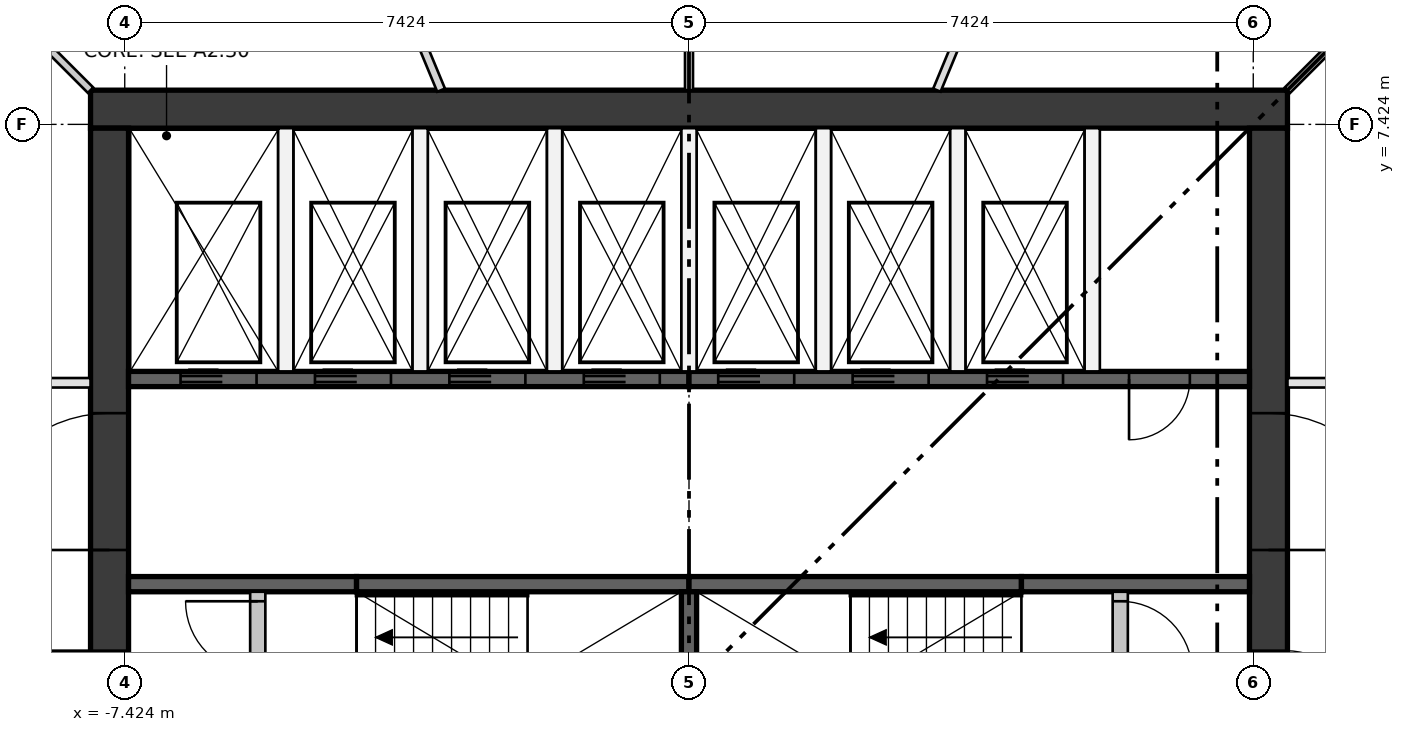
"""IFC4 building model, lengths in metres.
Left out: names, types, materials, properties, quantities, classifications, styles, units other than length and angle.
Written with IfcOpenShell. Run it as: python <this file> out.ifc"""

import sys

from ifc_helpers import new_model, si_unit, direction, frame, frame_2d, origin, place, context, subcontext, project, spatial, rectangle, extrude, element, fill, save


model = new_model("IFC4")
c1 = context("Model", 3, precision=1e-05, world=origin(), true_north=direction((0.0, 1.0)))
c2 = subcontext(c1, "Body", "Model", "MODEL_VIEW")
j1 = project(units=[si_unit("LENGTHUNIT", "METRE"), si_unit("PLANEANGLEUNIT", "RADIAN")], contexts=[c1])
p1 = place(None, origin())
s1 = spatial("IfcSite", under=j1, at=p1, CompositionType="ELEMENT")
p2 = place(p1, origin())
s2 = spatial("IfcBuilding", under=s1, at=p2, CompositionType="ELEMENT")
p3 = place(p2, frame((0.0, 0.0, 187.65)))
s3 = spatial("IfcBuildingStorey", under=s2, at=p3, CompositionType="ELEMENT", Elevation=187.65)
p4 = place(p3, frame((-7.874, 7.624, 0.0), z_axis=(0.0, 0.0, 1.0), x_axis=(1.0, 0.0, 0.0)))
e1 = element("IfcWall", 1, at=p4, inside=s3, PredefinedType="SHEAR", context=c2, shape_type="SweptSolid", body=[
    extrude(rectangle(XDim=15.748, YDim=0.5, at=frame_2d((7.874, 0.0))), origin(), (0.0, 0.0, 1.0), 3.35),
])
p5 = place(p3, frame((-7.624, -7.374, 0.0), z_axis=(0.0, 0.0, 1.0), x_axis=(0.0, 1.0, 0.0)))
e2 = element("IfcWall", 2, at=p5, inside=s3, PredefinedType="SHEAR", context=c2, shape_type="SweptSolid", body=[
    extrude(rectangle(XDim=14.748, YDim=0.5, at=frame_2d((7.374, 0.0))), origin(), (0.0, 0.0, 1.0), 3.35),
])
p6 = place(p5, frame((6.874, 0.0, 0.0)))
e3 = element("IfcOpeningElement", 3, at=p6, cuts=e2, PredefinedType="OPENING", context=c2, shape_type="SweptSolid", body=[
    extrude(rectangle(XDim=1.0, YDim=2.1, at=frame_2d((0.5, 1.05))), frame((0.0, 0.26, 0.0), z_axis=(0.0, -1.0, 0.0), x_axis=(1.0, 0.0, 0.0)), (0.0, 0.0, 1.0), 0.52),
])
p7 = place(p5, frame((3.75, 0.0, 0.0)))
e4 = element("IfcOpeningElement", 4, at=p7, cuts=e2, PredefinedType="OPENING", context=c2, shape_type="SweptSolid", body=[
    extrude(rectangle(XDim=1.8, YDim=2.1, at=frame_2d((0.9, 1.05))), frame((0.0, 0.26, 0.0), z_axis=(0.0, -1.0, 0.0), x_axis=(1.0, 0.0, 0.0)), (0.0, 0.0, 1.0), 0.52),
])
p8 = place(p5, frame((9.198, 0.0, 0.0)))
e5 = element("IfcOpeningElement", 5, at=p8, cuts=e2, PredefinedType="OPENING", context=c2, shape_type="SweptSolid", body=[
    extrude(rectangle(XDim=1.8, YDim=2.1, at=frame_2d((0.9, 1.05))), frame((0.0, 0.26, 0.0), z_axis=(0.0, -1.0, 0.0), x_axis=(1.0, 0.0, 0.0)), (0.0, 0.0, 1.0), 0.52),
])
p9 = place(p3, frame((7.624, -7.374, 0.0), z_axis=(0.0, 0.0, 1.0), x_axis=(0.0, 1.0, 0.0)))
e6 = element("IfcWall", 6, at=p9, inside=s3, PredefinedType="SHEAR", context=c2, shape_type="SweptSolid", body=[
    extrude(rectangle(XDim=14.748, YDim=0.5, at=frame_2d((7.374, 0.0))), origin(), (0.0, 0.0, 1.0), 3.35),
])
p10 = place(p9, frame((6.874, 0.0, 0.0)))
e7 = element("IfcOpeningElement", 7, at=p10, cuts=e6, PredefinedType="OPENING", context=c2, shape_type="SweptSolid", body=[
    extrude(rectangle(XDim=1.0, YDim=2.1, at=frame_2d((0.5, 1.05))), frame((0.0, 0.26, 0.0), z_axis=(0.0, -1.0, 0.0), x_axis=(1.0, 0.0, 0.0)), (0.0, 0.0, 1.0), 0.52),
])
p11 = place(p9, frame((3.75, 0.0, 0.0)))
e8 = element("IfcOpeningElement", 8, at=p11, cuts=e6, PredefinedType="OPENING", context=c2, shape_type="SweptSolid", body=[
    extrude(rectangle(XDim=1.8, YDim=2.1, at=frame_2d((0.9, 1.05))), frame((0.0, 0.26, 0.0), z_axis=(0.0, -1.0, 0.0), x_axis=(1.0, 0.0, 0.0)), (0.0, 0.0, 1.0), 0.52),
])
p12 = place(p9, frame((9.198, 0.0, 0.0)))
e9 = element("IfcOpeningElement", 9, at=p12, cuts=e6, PredefinedType="OPENING", context=c2, shape_type="SweptSolid", body=[
    extrude(rectangle(XDim=1.8, YDim=2.1, at=frame_2d((0.9, 1.05))), frame((0.0, 0.26, 0.0), z_axis=(0.0, -1.0, 0.0), x_axis=(1.0, 0.0, 0.0)), (0.0, 0.0, 1.0), 0.52),
])
p13 = place(p3, frame((-7.374, 4.074, 0.0), z_axis=(0.0, 0.0, 1.0), x_axis=(1.0, 0.0, 0.0)))
e10 = element("IfcWall", 10, at=p13, inside=s3, PredefinedType="SHEAR", context=c2, shape_type="SweptSolid", body=[
    extrude(rectangle(XDim=7.374, YDim=0.2, at=frame_2d((3.687, 0.0))), origin(), (0.0, 0.0, 1.0), 3.0),
])
p14 = place(p13, frame((0.684, 0.0, 0.0)))
e11 = element("IfcOpeningElement", 11, at=p14, cuts=e10, PredefinedType="OPENING", context=c2, shape_type="SweptSolid", body=[
    extrude(rectangle(XDim=1.0, YDim=2.1, at=frame_2d((0.5, 1.05))), frame((0.0, 0.11, 0.0), z_axis=(0.0, -1.0, 0.0), x_axis=(1.0, 0.0, 0.0)), (0.0, 0.0, 1.0), 0.22),
])
p15 = place(p13, frame((2.453, 0.0, 0.0)))
e12 = element("IfcOpeningElement", 12, at=p15, cuts=e10, PredefinedType="OPENING", context=c2, shape_type="SweptSolid", body=[
    extrude(rectangle(XDim=1.0, YDim=2.1, at=frame_2d((0.5, 1.05))), frame((0.0, 0.11, 0.0), z_axis=(0.0, -1.0, 0.0), x_axis=(1.0, 0.0, 0.0)), (0.0, 0.0, 1.0), 0.22),
])
p16 = place(p13, frame((4.221, 0.0, 0.0)))
e13 = element("IfcOpeningElement", 13, at=p16, cuts=e10, PredefinedType="OPENING", context=c2, shape_type="SweptSolid", body=[
    extrude(rectangle(XDim=1.0, YDim=2.1, at=frame_2d((0.5, 1.05))), frame((0.0, 0.11, 0.0), z_axis=(0.0, -1.0, 0.0), x_axis=(1.0, 0.0, 0.0)), (0.0, 0.0, 1.0), 0.22),
])
p17 = place(p13, frame((5.99, 0.0, 0.0)))
e14 = element("IfcOpeningElement", 14, at=p17, cuts=e10, PredefinedType="OPENING", context=c2, shape_type="SweptSolid", body=[
    extrude(rectangle(XDim=1.0, YDim=2.1, at=frame_2d((0.5, 1.05))), frame((0.0, 0.11, 0.0), z_axis=(0.0, -1.0, 0.0), x_axis=(1.0, 0.0, 0.0)), (0.0, 0.0, 1.0), 0.22),
])
p18 = place(p3, frame((0.0, 4.074, 0.0), z_axis=(0.0, 0.0, 1.0), x_axis=(1.0, 0.0, 0.0)))
e15 = element("IfcWall", 15, at=p18, inside=s3, PredefinedType="SHEAR", context=c2, shape_type="SweptSolid", body=[
    extrude(rectangle(XDim=7.374, YDim=0.2, at=frame_2d((3.687, 0.0))), origin(), (0.0, 0.0, 1.0), 3.0),
])
p19 = place(p18, frame((0.384, 0.0, 0.0)))
e16 = element("IfcOpeningElement", 16, at=p19, cuts=e15, PredefinedType="OPENING", context=c2, shape_type="SweptSolid", body=[
    extrude(rectangle(XDim=1.0, YDim=2.1, at=frame_2d((0.5, 1.05))), frame((0.0, 0.11, 0.0), z_axis=(0.0, -1.0, 0.0), x_axis=(1.0, 0.0, 0.0)), (0.0, 0.0, 1.0), 0.22),
])
p20 = place(p18, frame((2.153, 0.0, 0.0)))
e17 = element("IfcOpeningElement", 17, at=p20, cuts=e15, PredefinedType="OPENING", context=c2, shape_type="SweptSolid", body=[
    extrude(rectangle(XDim=1.0, YDim=2.1, at=frame_2d((0.5, 1.05))), frame((0.0, 0.11, 0.0), z_axis=(0.0, -1.0, 0.0), x_axis=(1.0, 0.0, 0.0)), (0.0, 0.0, 1.0), 0.22),
])
p21 = place(p18, frame((3.921, 0.0, 0.0)))
e18 = element("IfcOpeningElement", 18, at=p21, cuts=e15, PredefinedType="OPENING", context=c2, shape_type="SweptSolid", body=[
    extrude(rectangle(XDim=1.0, YDim=2.1, at=frame_2d((0.5, 1.05))), frame((0.0, 0.11, 0.0), z_axis=(0.0, -1.0, 0.0), x_axis=(1.0, 0.0, 0.0)), (0.0, 0.0, 1.0), 0.22),
])
p22 = place(p18, frame((5.79, 0.0, 0.0)))
e19 = element("IfcOpeningElement", 19, at=p22, cuts=e15, PredefinedType="OPENING", context=c2, shape_type="SweptSolid", body=[
    extrude(rectangle(XDim=0.8, YDim=2.1, at=frame_2d((0.4, 1.05))), frame((0.0, 0.11, 0.0), z_axis=(0.0, -1.0, 0.0), x_axis=(1.0, 0.0, 0.0)), (0.0, 0.0, 1.0), 0.22),
])
p23 = place(p3, frame((-7.374, 1.375, 0.0), z_axis=(0.0, 0.0, 1.0), x_axis=(1.0, 0.0, 0.0)))
e20 = element("IfcWall", 20, at=p23, inside=s3, PredefinedType="SHEAR", context=c2, shape_type="SweptSolid", body=[
    extrude(rectangle(XDim=3.0, YDim=0.2, at=frame_2d((1.5, 0.0))), origin(), (0.0, 0.0, 1.0), 3.0),
])
for number, where, z_axis, x_axis in (
    (21, (-4.374, 1.375, 0.0), (0.0, 0.0, 1.0), (1.0, 0.0, 0.0)),
    (22, (0.0, 1.375, 0.0), (0.0, 0.0, 1.0), (1.0, 0.0, 0.0)),
):
    element("IfcWall", number, at=place(p3, frame(where, z_axis=z_axis, x_axis=x_axis)), inside=s3, PredefinedType="SHEAR", context=c2, shape_type="SweptSolid", body=[
        extrude(rectangle(XDim=4.374, YDim=0.2, at=frame_2d((2.187, 0.0))), origin(), (0.0, 0.0, 1.0), 3.0),
    ])
p24 = place(p3, frame((4.374, 1.375, 0.0), z_axis=(0.0, 0.0, 1.0), x_axis=(1.0, 0.0, 0.0)))
e23 = element("IfcWall", 23, at=p24, inside=s3, PredefinedType="SHEAR", context=c2, shape_type="SweptSolid", body=[
    extrude(rectangle(XDim=3.0, YDim=0.2, at=frame_2d((1.5, 0.0))), origin(), (0.0, 0.0, 1.0), 3.0),
])
p25 = place(p3, frame((0.0, -1.275, 0.0), z_axis=(0.0, 0.0, 1.0), x_axis=(0.0, 1.0, 0.0)))
e24 = element("IfcWall", 24, at=p25, inside=s3, PredefinedType="SHEAR", context=c2, shape_type="SweptSolid", body=[
    extrude(rectangle(XDim=2.55, YDim=0.2, at=frame_2d((1.275, 0.0))), origin(), (0.0, 0.0, 1.0), 3.0),
])
for number, where, z_axis, x_axis in (
    (25, (-5.305, 4.174, 0.0), (0.0, 0.0, 1.0), (0.0, 1.0, 0.0)),
    (26, (-3.537, 4.174, 0.0), (0.0, 0.0, 1.0), (0.0, 1.0, 0.0)),
    (27, (-1.769, 4.174, 0.0), (0.0, 0.0, 1.0), (0.0, 1.0, 0.0)),
    (28, (0.0, 4.174, 0.0), (0.0, 0.0, 1.0), (0.0, 1.0, 0.0)),
    (29, (1.769, 4.174, 0.0), (0.0, 0.0, 1.0), (0.0, 1.0, 0.0)),
    (30, (3.537, 4.174, 0.0), (0.0, 0.0, 1.0), (0.0, 1.0, 0.0)),
    (31, (5.305, 4.174, 0.0), (0.0, 0.0, 1.0), (0.0, 1.0, 0.0)),
):
    element("IfcWall", number, at=place(p3, frame(where, z_axis=z_axis, x_axis=x_axis)), inside=s3, PredefinedType="PARTITIONING", context=c2, shape_type="SweptSolid", body=[
        extrude(rectangle(XDim=3.2, YDim=0.2, at=frame_2d((1.6, 0.0))), origin(), (0.0, 0.0, 1.0), 3.0),
    ])
p26 = place(p3, frame((-5.674, -1.275, 0.0), z_axis=(0.0, 0.0, 1.0), x_axis=(0.0, 1.0, 0.0)))
e32 = element("IfcWall", 32, at=p26, inside=s3, PredefinedType="PARTITIONING", context=c2, shape_type="SweptSolid", body=[
    extrude(rectangle(XDim=2.55, YDim=0.2, at=frame_2d((1.275, 0.0))), origin(), (0.0, 0.0, 1.0), 3.0),
])
p27 = place(p26, frame((0.125, 0.0, 0.0)))
e33 = element("IfcOpeningElement", 33, at=p27, cuts=e32, PredefinedType="OPENING", context=c2, shape_type="SweptSolid", body=[
    extrude(rectangle(XDim=0.95, YDim=2.1, at=frame_2d((0.475, 1.05))), frame((0.0, 0.11, 0.0), z_axis=(0.0, -1.0, 0.0), x_axis=(1.0, 0.0, 0.0)), (0.0, 0.0, 1.0), 0.22),
])
p28 = place(p26, frame((1.475, 0.0, 0.0)))
e34 = element("IfcOpeningElement", 34, at=p28, cuts=e32, PredefinedType="OPENING", context=c2, shape_type="SweptSolid", body=[
    extrude(rectangle(XDim=0.95, YDim=2.1, at=frame_2d((0.475, 1.05))), frame((0.0, 0.11, 0.0), z_axis=(0.0, -1.0, 0.0), x_axis=(1.0, 0.0, 0.0)), (0.0, 0.0, 1.0), 0.22),
])
p29 = place(p3, frame((5.674, -1.275, 0.0), z_axis=(0.0, 0.0, 1.0), x_axis=(0.0, 1.0, 0.0)))
e35 = element("IfcWall", 35, at=p29, inside=s3, PredefinedType="PARTITIONING", context=c2, shape_type="SweptSolid", body=[
    extrude(rectangle(XDim=2.55, YDim=0.2, at=frame_2d((1.275, 0.0))), origin(), (0.0, 0.0, 1.0), 3.0),
])
p30 = place(p29, frame((0.125, 0.0, 0.0)))
e36 = element("IfcOpeningElement", 36, at=p30, cuts=e35, PredefinedType="OPENING", context=c2, shape_type="SweptSolid", body=[
    extrude(rectangle(XDim=0.95, YDim=2.1, at=frame_2d((0.475, 1.05))), frame((0.0, 0.11, 0.0), z_axis=(0.0, -1.0, 0.0), x_axis=(1.0, 0.0, 0.0)), (0.0, 0.0, 1.0), 0.22),
])
p31 = place(p29, frame((1.475, 0.0, 0.0)))
e37 = element("IfcOpeningElement", 37, at=p31, cuts=e35, PredefinedType="OPENING", context=c2, shape_type="SweptSolid", body=[
    extrude(rectangle(XDim=0.95, YDim=2.1, at=frame_2d((0.475, 1.05))), frame((0.0, 0.11, 0.0), z_axis=(0.0, -1.0, 0.0), x_axis=(1.0, 0.0, 0.0)), (0.0, 0.0, 1.0), 0.22),
])
p32 = place(p3, frame((7.874, 4.024, 0.0), z_axis=(0.0, 0.0, 1.0), x_axis=(1.0, 0.0, 0.0)))
e38 = element("IfcWall", 38, at=p32, inside=s3, PredefinedType="PARTITIONING", context=c2, shape_type="SweptSolid", body=[
    extrude(rectangle(XDim=3.95, YDim=0.125, at=frame_2d((1.975, 0.0))), origin(), (0.0, 0.0, 1.0), 3.0),
])
p33 = place(p32, frame((1.3, 0.0, 0.0)))
e39 = element("IfcOpeningElement", 39, at=p33, cuts=e38, PredefinedType="OPENING", context=c2, shape_type="SweptSolid", body=[
    extrude(rectangle(XDim=1.0, YDim=2.1, at=frame_2d((0.5, 1.05))), frame((0.0, 0.073, 0.0), z_axis=(0.0, -1.0, 0.0), x_axis=(1.0, 0.0, 0.0)), (0.0, 0.0, 1.0), 0.145),
])
p34 = place(p3, frame((-11.087, 4.024, 0.0), z_axis=(0.0, 0.0, 1.0), x_axis=(1.0, 0.0, 0.0)))
e40 = element("IfcWall", 40, at=p34, inside=s3, PredefinedType="PARTITIONING", context=c2, shape_type="SweptSolid", body=[
    extrude(rectangle(XDim=3.213, YDim=0.125, at=frame_2d((1.606, 0.0))), origin(), (0.0, 0.0, 1.0), 3.0),
])
p35 = place(p34, frame((1.1, 0.0, 0.0)))
e41 = element("IfcOpeningElement", 41, at=p35, cuts=e40, PredefinedType="OPENING", context=c2, shape_type="SweptSolid", body=[
    extrude(rectangle(XDim=1.0, YDim=2.1, at=frame_2d((0.5, 1.05))), frame((0.0, 0.073, 0.0), z_axis=(0.0, -1.0, 0.0), x_axis=(1.0, 0.0, 0.0)), (0.0, 0.0, 1.0), 0.145),
])
p36 = place(p3, frame((7.874, 7.874, 0.0), z_axis=(0.0, 0.0, 1.0), x_axis=(0.707106781187, 0.707106781187, 0.0)))
e42 = element("IfcWall", 42, at=p36, inside=s3, PredefinedType="PARTITIONING", context=c2, shape_type="SweptSolid", body=[
    extrude(rectangle(XDim=5.834, YDim=0.1, at=frame_2d((2.917, 0.0))), origin(), (0.0, 0.0, 1.0), 3.0),
])
p37 = place(p36, frame((1.8, 0.0, 0.0)))
e43 = element("IfcOpeningElement", 43, at=p37, cuts=e42, PredefinedType="OPENING", context=c2, shape_type="SweptSolid", body=[
    extrude(rectangle(XDim=1.0, YDim=2.1, at=frame_2d((0.5, 1.05))), frame((0.0, 0.06, 0.0), z_axis=(0.0, -1.0, 0.0), x_axis=(1.0, 0.0, 0.0)), (0.0, 0.0, 1.0), 0.12),
])
p38 = place(p3, frame((3.261, 7.874, 0.0), z_axis=(0.0, 0.0, 1.0), x_axis=(0.382701956612, 0.923871859299, 0.0)))
e44 = element("IfcWall", 44, at=p38, inside=s3, PredefinedType="PARTITIONING", context=c2, shape_type="SweptSolid", body=[
    extrude(rectangle(XDim=4.577, YDim=0.105, at=frame_2d((2.289, 0.0))), origin(), (0.0, 0.0, 1.0), 3.0),
])
p39 = place(p38, frame((1.8, 0.0, 0.0)))
e45 = element("IfcOpeningElement", 45, at=p39, cuts=e44, PredefinedType="OPENING", context=c2, shape_type="SweptSolid", body=[
    extrude(rectangle(XDim=1.0, YDim=2.1, at=frame_2d((0.5, 1.05))), frame((0.0, 0.062, 0.0), z_axis=(0.0, -1.0, 0.0), x_axis=(1.0, 0.0, 0.0)), (0.0, 0.0, 1.0), 0.125),
])
p40 = place(p3, frame((0.0, 7.874, 0.0), z_axis=(0.0, 0.0, 1.0), x_axis=(0.0, 1.0, 0.0)))
e46 = element("IfcWall", 46, at=p40, inside=s3, PredefinedType="PARTITIONING", context=c2, shape_type="SweptSolid", body=[
    extrude(rectangle(XDim=5.226, YDim=0.105, at=frame_2d((2.613, 0.0))), origin(), (0.0, 0.0, 1.0), 3.0),
])
p41 = place(p3, frame((-3.261, 7.874, 0.0), z_axis=(0.0, 0.0, 1.0), x_axis=(-0.382701956612, 0.923871859299, 0.0)))
e47 = element("IfcWall", 47, at=p41, inside=s3, PredefinedType="PARTITIONING", context=c2, shape_type="SweptSolid", body=[
    extrude(rectangle(XDim=4.577, YDim=0.11, at=frame_2d((2.289, 0.0))), origin(), (0.0, 0.0, 1.0), 3.0),
])
p42 = place(p3, frame((-12.0, 12.0, 0.0), z_axis=(0.0, 0.0, 1.0), x_axis=(0.707106781187, -0.707106781187, 0.0)))
e48 = element("IfcWall", 48, at=p42, inside=s3, PredefinedType="PARTITIONING", context=c2, shape_type="SweptSolid", body=[
    extrude(rectangle(XDim=5.834, YDim=0.1, at=frame_2d((2.917, 0.0))), origin(), (0.0, 0.0, 1.0), 3.0),
])
p43 = place(p42, frame((3.0, 0.0, 0.0)))
e49 = element("IfcOpeningElement", 49, at=p43, cuts=e48, PredefinedType="OPENING", context=c2, shape_type="SweptSolid", body=[
    extrude(rectangle(XDim=1.0, YDim=2.1, at=frame_2d((0.5, 1.05))), frame((0.0, 0.06, 0.0), z_axis=(0.0, -1.0, 0.0), x_axis=(1.0, 0.0, 0.0)), (0.0, 0.0, 1.0), 0.12),
])
p44 = place(p14, frame((1.0, 0.0, 0.0), z_axis=(0.0, 0.0, 1.0), x_axis=(-1.0, 0.0, 0.0)))
e50 = element("IfcDoor", 50, at=p44, inside=s3, OperationType="DOUBLE_DOOR_SLIDING", PredefinedType="DOOR", context=c2, shape_type="SweptSolid", body=[
    extrude(rectangle(XDim=1.0, YDim=2.1, at=frame_2d((0.5, 1.05))), frame((0.0, 0.025, 0.0), z_axis=(0.0, -1.0, 0.0), x_axis=(1.0, 0.0, 0.0)), (0.0, 0.0, 1.0), 0.05),
])
fill(e11, e50)
p45 = place(p15, frame((1.0, 0.0, 0.0), z_axis=(0.0, 0.0, 1.0), x_axis=(-1.0, 0.0, 0.0)))
e51 = element("IfcDoor", 51, at=p45, inside=s3, OperationType="DOUBLE_DOOR_SLIDING", PredefinedType="DOOR", context=c2, shape_type="SweptSolid", body=[
    extrude(rectangle(XDim=1.0, YDim=2.1, at=frame_2d((0.5, 1.05))), frame((0.0, 0.025, 0.0), z_axis=(0.0, -1.0, 0.0), x_axis=(1.0, 0.0, 0.0)), (0.0, 0.0, 1.0), 0.05),
])
fill(e12, e51)
p46 = place(p16, frame((1.0, 0.0, 0.0), z_axis=(0.0, 0.0, 1.0), x_axis=(-1.0, 0.0, 0.0)))
e52 = element("IfcDoor", 52, at=p46, inside=s3, OperationType="DOUBLE_DOOR_SLIDING", PredefinedType="DOOR", context=c2, shape_type="SweptSolid", body=[
    extrude(rectangle(XDim=1.0, YDim=2.1, at=frame_2d((0.5, 1.05))), frame((0.0, 0.025, 0.0), z_axis=(0.0, -1.0, 0.0), x_axis=(1.0, 0.0, 0.0)), (0.0, 0.0, 1.0), 0.05),
])
fill(e13, e52)
p47 = place(p17, frame((1.0, 0.0, 0.0), z_axis=(0.0, 0.0, 1.0), x_axis=(-1.0, 0.0, 0.0)))
e53 = element("IfcDoor", 53, at=p47, inside=s3, OperationType="DOUBLE_DOOR_SLIDING", PredefinedType="DOOR", context=c2, shape_type="SweptSolid", body=[
    extrude(rectangle(XDim=1.0, YDim=2.1, at=frame_2d((0.5, 1.05))), frame((0.0, 0.025, 0.0), z_axis=(0.0, -1.0, 0.0), x_axis=(1.0, 0.0, 0.0)), (0.0, 0.0, 1.0), 0.05),
])
fill(e14, e53)
p48 = place(p19, frame((1.0, 0.0, 0.0), z_axis=(0.0, 0.0, 1.0), x_axis=(-1.0, 0.0, 0.0)))
e54 = element("IfcDoor", 54, at=p48, inside=s3, OperationType="DOUBLE_DOOR_SLIDING", PredefinedType="DOOR", context=c2, shape_type="SweptSolid", body=[
    extrude(rectangle(XDim=1.0, YDim=2.1, at=frame_2d((0.5, 1.05))), frame((0.0, 0.025, 0.0), z_axis=(0.0, -1.0, 0.0), x_axis=(1.0, 0.0, 0.0)), (0.0, 0.0, 1.0), 0.05),
])
fill(e16, e54)
p49 = place(p20, frame((1.0, 0.0, 0.0), z_axis=(0.0, 0.0, 1.0), x_axis=(-1.0, 0.0, 0.0)))
e55 = element("IfcDoor", 55, at=p49, inside=s3, OperationType="DOUBLE_DOOR_SLIDING", PredefinedType="DOOR", context=c2, shape_type="SweptSolid", body=[
    extrude(rectangle(XDim=1.0, YDim=2.1, at=frame_2d((0.5, 1.05))), frame((0.0, 0.025, 0.0), z_axis=(0.0, -1.0, 0.0), x_axis=(1.0, 0.0, 0.0)), (0.0, 0.0, 1.0), 0.05),
])
fill(e17, e55)
p50 = place(p21, frame((1.0, 0.0, 0.0), z_axis=(0.0, 0.0, 1.0), x_axis=(-1.0, 0.0, 0.0)))
e56 = element("IfcDoor", 56, at=p50, inside=s3, OperationType="DOUBLE_DOOR_SLIDING", PredefinedType="DOOR", context=c2, shape_type="SweptSolid", body=[
    extrude(rectangle(XDim=1.0, YDim=2.1, at=frame_2d((0.5, 1.05))), frame((0.0, 0.025, 0.0), z_axis=(0.0, -1.0, 0.0), x_axis=(1.0, 0.0, 0.0)), (0.0, 0.0, 1.0), 0.05),
])
fill(e18, e56)
p51 = place(p28, origin())
e57 = element("IfcDoor", 57, at=p51, inside=s3, OperationType="SINGLE_SWING_RIGHT", PredefinedType="DOOR", context=c2, shape_type="SweptSolid", body=[
    extrude(rectangle(XDim=0.95, YDim=2.1, at=frame_2d((0.475, 1.05))), frame((0.0, 0.025, 0.0), z_axis=(0.0, -1.0, 0.0), x_axis=(1.0, 0.0, 0.0)), (0.0, 0.0, 1.0), 0.05),
])
fill(e34, e57)
p52 = place(p31, frame((0.95, 0.0, 0.0), z_axis=(0.0, 0.0, 1.0), x_axis=(-1.0, 0.0, 0.0)))
e58 = element("IfcDoor", 58, at=p52, inside=s3, OperationType="SINGLE_SWING_LEFT", PredefinedType="DOOR", context=c2, shape_type="SweptSolid", body=[
    extrude(rectangle(XDim=0.95, YDim=2.1, at=frame_2d((0.475, 1.05))), frame((0.0, 0.025, 0.0), z_axis=(0.0, -1.0, 0.0), x_axis=(1.0, 0.0, 0.0)), (0.0, 0.0, 1.0), 0.05),
])
fill(e37, e58)
p53 = place(p22, frame((0.8, 0.0, 0.0), z_axis=(0.0, 0.0, 1.0), x_axis=(-1.0, 0.0, 0.0)))
e59 = element("IfcDoor", 59, at=p53, inside=s3, OperationType="SINGLE_SWING_LEFT", PredefinedType="DOOR", context=c2, shape_type="SweptSolid", body=[
    extrude(rectangle(XDim=0.8, YDim=2.1, at=frame_2d((0.4, 1.05))), frame((0.0, 0.025, 0.0), z_axis=(0.0, -1.0, 0.0), x_axis=(1.0, 0.0, 0.0)), (0.0, 0.0, 1.0), 0.05),
])
fill(e19, e59)
p54 = place(p6, origin())
e60 = element("IfcDoor", 60, at=p54, inside=s3, OperationType="SINGLE_SWING_RIGHT", PredefinedType="DOOR", context=c2, shape_type="SweptSolid", body=[
    extrude(rectangle(XDim=1.0, YDim=2.1, at=frame_2d((0.5, 1.05))), frame((0.0, 0.25, 0.0), z_axis=(0.0, -1.0, 0.0), x_axis=(1.0, 0.0, 0.0)), (0.0, 0.0, 1.0), 0.05),
])
fill(e3, e60)
p55 = place(p8, origin())
e61 = element("IfcDoor", 61, at=p55, inside=s3, OperationType="DOUBLE_DOOR_SINGLE_SWING", PredefinedType="DOOR", context=c2, shape_type="SweptSolid", body=[
    extrude(rectangle(XDim=1.8, YDim=2.1, at=frame_2d((0.9, 1.05))), frame((0.0, 0.025, 0.0), z_axis=(0.0, -1.0, 0.0), x_axis=(1.0, 0.0, 0.0)), (0.0, 0.0, 1.0), 0.05),
])
fill(e5, e61)
p56 = place(p10, frame((1.0, 0.0, 0.0), z_axis=(0.0, 0.0, 1.0), x_axis=(-1.0, 0.0, 0.0)))
e62 = element("IfcDoor", 62, at=p56, inside=s3, OperationType="SINGLE_SWING_LEFT", PredefinedType="DOOR", context=c2, shape_type="SweptSolid", body=[
    extrude(rectangle(XDim=1.0, YDim=2.1, at=frame_2d((0.5, 1.05))), frame((0.0, 0.25, 0.0), z_axis=(0.0, -1.0, 0.0), x_axis=(1.0, 0.0, 0.0)), (0.0, 0.0, 1.0), 0.05),
])
fill(e7, e62)
p57 = place(p12, frame((1.8, 0.0, 0.0), z_axis=(0.0, 0.0, 1.0), x_axis=(-1.0, 0.0, 0.0)))
e63 = element("IfcDoor", 63, at=p57, inside=s3, OperationType="DOUBLE_DOOR_SINGLE_SWING", PredefinedType="DOOR", context=c2, shape_type="SweptSolid", body=[
    extrude(rectangle(XDim=1.8, YDim=2.1, at=frame_2d((0.9, 1.05))), frame((0.0, 0.025, 0.0), z_axis=(0.0, -1.0, 0.0), x_axis=(1.0, 0.0, 0.0)), (0.0, 0.0, 1.0), 0.05),
])
fill(e9, e63)
save(model, sys.argv[1])
